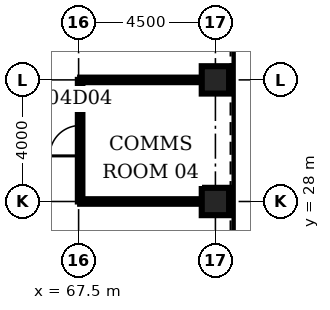
"""IFC4 building model, lengths in metres.
Left out: names, types, materials, properties, quantities, classifications, styles, units other than length and angle.
Written with IfcOpenShell. Run it as: python <this file> out.ifc"""

import sys

from ifc_helpers import new_model, si_unit, direction, frame, frame_2d, origin, origin_2d, place, context, subcontext, project, spatial, rectangle, hollow_rectangle, extrude, element, fill, save


model = new_model("IFC4")
c1 = context("Model", 3, precision=1e-05, world=origin(), true_north=direction((0.0, 1.0)))
c2 = subcontext(c1, "Body", "Model", "MODEL_VIEW")
j1 = project(units=[si_unit("LENGTHUNIT", "METRE"), si_unit("PLANEANGLEUNIT", "RADIAN")], contexts=[c1])
p1 = place(None, origin())
s1 = spatial("IfcSite", under=j1, at=p1, CompositionType="ELEMENT")
p2 = place(p1, origin())
s2 = spatial("IfcBuilding", under=s1, at=p2, CompositionType="ELEMENT")
p3 = place(p2, frame((0.0, 0.0, 23.0)))
s3 = spatial("IfcBuildingStorey", under=s2, at=p3, CompositionType="ELEMENT", Elevation=23.0)
for number, where, z_axis, x_axis in (
    (1, (72.0, 28.0, 0.0), (0.0, 0.0, 1.0), (1.0, 0.0, 0.0)),
    (2, (72.0, 32.0, 0.0), (0.0, 0.0, 1.0), (1.0, 0.0, 0.0)),
):
    element("IfcColumn", number, at=place(p3, frame(where, z_axis=z_axis, x_axis=x_axis)), inside=s3, PredefinedType="COLUMN", context=c2, shape_type="SweptSolid", body=[
        extrude(hollow_rectangle(XDim=0.9, YDim=0.9, WallThickness=0.12, at=origin_2d()), origin(), (0.0, 0.0, 1.0), 4.5),
    ])
for number, where, z_axis, x_axis in (
    (3, (67.55, 28.0, 0.0), (0.0, 0.0, 1.0), (1.0, 0.0, 0.0)),
    (4, (67.55, 32.0, 0.0), (0.0, 0.0, 1.0), (1.0, 0.0, 0.0)),
):
    element("IfcWall", number, at=place(p3, frame(where, z_axis=z_axis, x_axis=x_axis)), inside=s3, PredefinedType="PARTITIONING", context=c2, shape_type="SweptSolid", body=[
        extrude(rectangle(XDim=4.0, YDim=0.15, at=frame_2d((2.0, 0.0))), origin(), (0.0, 0.0, 1.0), 3.0),
    ])
p4 = place(p3, frame((67.55, 28.0, 0.0), z_axis=(0.0, 0.0, 1.0), x_axis=(0.0, 1.0, 0.0)))
e5 = element("IfcWall", 5, at=p4, inside=s3, PredefinedType="PARTITIONING", context=c2, shape_type="SweptSolid", body=[
    extrude(rectangle(XDim=4.0, YDim=0.15, at=frame_2d((2.0, 0.0))), origin(), (0.0, 0.0, 1.0), 3.0),
])
p5 = place(p4, frame((1.5, 0.0, 0.0)))
e6 = element("IfcOpeningElement", 6, at=p5, cuts=e5, PredefinedType="OPENING", context=c2, shape_type="SweptSolid", body=[
    extrude(rectangle(XDim=1.0, YDim=2.1, at=frame_2d((0.5, 1.05))), frame((0.0, 0.085, 0.0), z_axis=(0.0, -1.0, 0.0), x_axis=(1.0, 0.0, 0.0)), (0.0, 0.0, 1.0), 0.17),
])
p6 = place(p5, origin())
e7 = element("IfcDoor", 7, at=p6, inside=s3, OperationType="SINGLE_SWING_LEFT", PredefinedType="DOOR", context=c2, shape_type="SweptSolid", body=[
    extrude(rectangle(XDim=1.0, YDim=2.1, at=frame_2d((0.5, 1.05))), frame((0.0, 0.025, 0.0), z_axis=(0.0, -1.0, 0.0), x_axis=(1.0, 0.0, 0.0)), (0.0, 0.0, 1.0), 0.05),
])
fill(e6, e7)
save(model, sys.argv[1])
